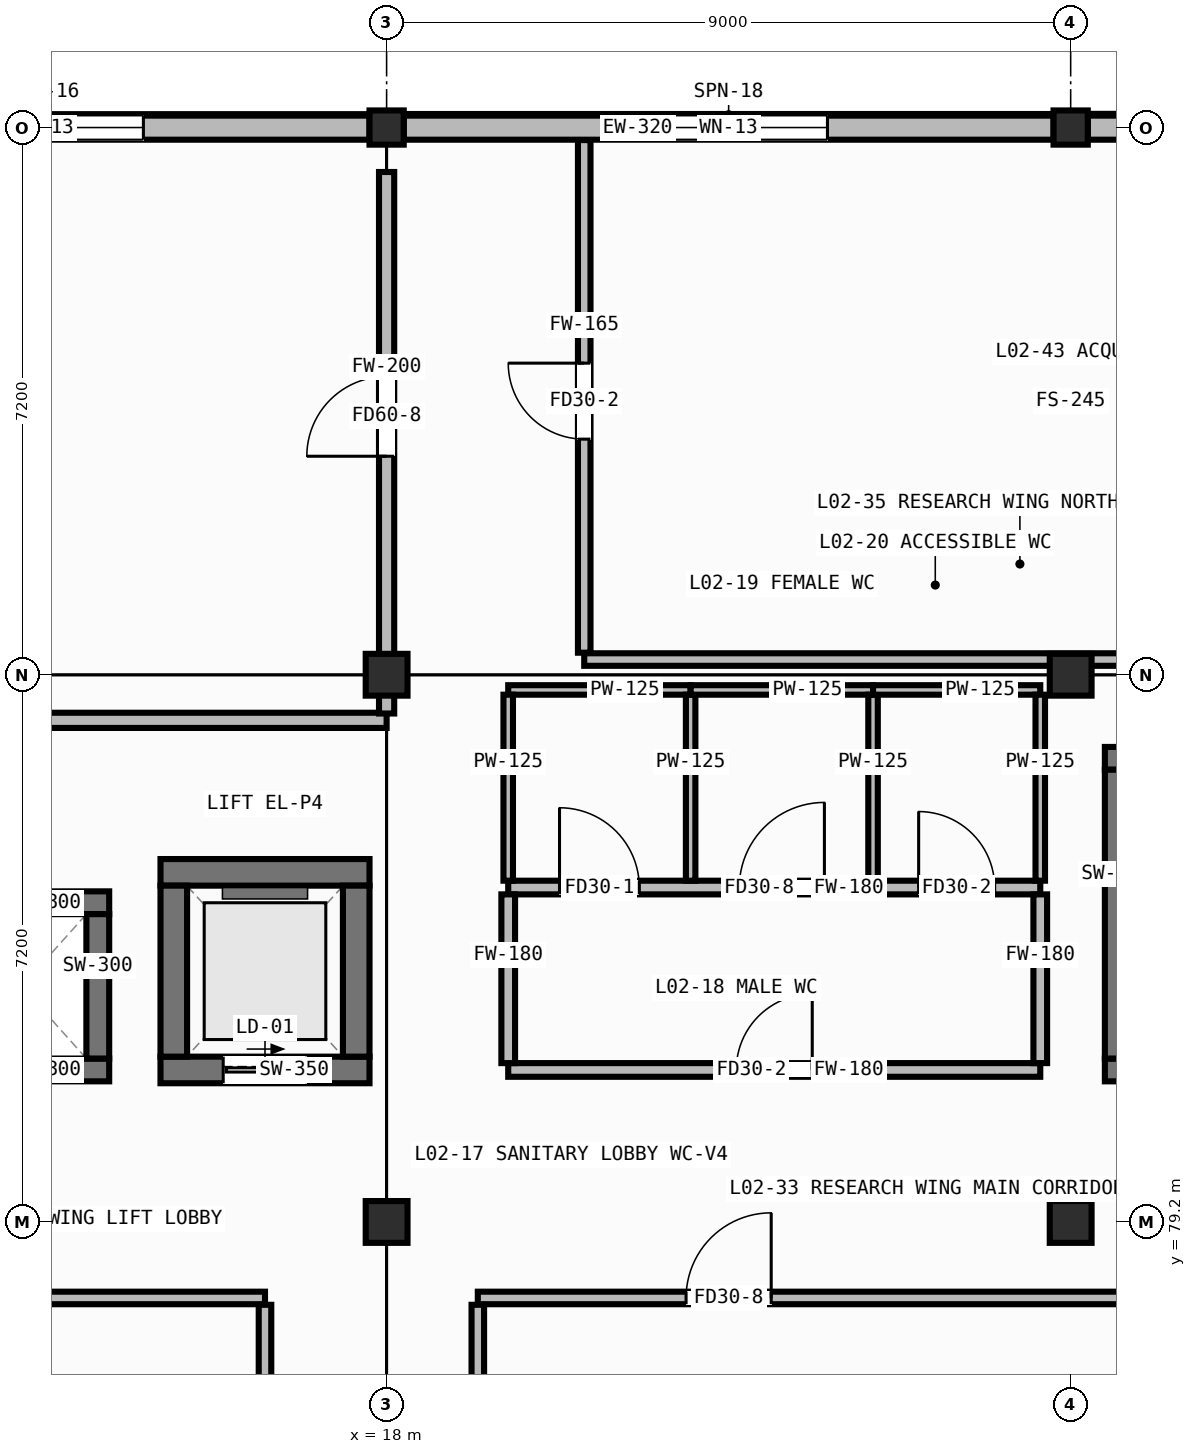
"""IFC4 building model, lengths in metres.
Left out: names, types, materials, properties, quantities, classifications, styles, units other than length and angle.
Written with IfcOpenShell. Run it as: python <this file> out.ifc"""

import sys

from ifc_helpers import new_model, si_unit, direction, frame, frame_2d, origin, origin_2d, place, context, subcontext, project, spatial, rectangle, hollow_rectangle, extrude, element, fill, save


model = new_model("IFC4")
c1 = context("Model", 3, precision=1e-05, world=origin(), true_north=direction((0.0, 1.0)))
c2 = subcontext(c1, "Body", "Model", "MODEL_VIEW")
j1 = project(units=[si_unit("LENGTHUNIT", "METRE"), si_unit("PLANEANGLEUNIT", "RADIAN")], contexts=[c1])
p1 = place(None, origin())
s1 = spatial("IfcSite", under=j1, at=p1, CompositionType="ELEMENT")
p2 = place(p1, origin())
s2 = spatial("IfcBuilding", under=s1, at=p2, CompositionType="ELEMENT")
p3 = place(p2, frame((0.0, 0.0, 4.8)))
s3 = spatial("IfcBuildingStorey", under=s2, at=p3, CompositionType="ELEMENT", Elevation=4.8)
for number, where, z_axis, x_axis in (
    (1, (18.0, 79.2, 0.0), (0.0, 0.0, 1.0), (1.0, 0.0, 0.0)),
    (2, (18.0, 86.4, 0.0), (0.0, 0.0, 1.0), (1.0, 0.0, 0.0)),
):
    element("IfcColumn", number, at=place(p3, frame(where, z_axis=z_axis, x_axis=x_axis)), inside=s3, PredefinedType="COLUMN", context=c2, shape_type="SweptSolid", body=[
        extrude(hollow_rectangle(XDim=0.55, YDim=0.55, WallThickness=0.022, at=origin_2d()), origin(), (0.0, 0.0, 1.0), 4.0),
    ])
p4 = place(p3, frame((18.0, 93.6, 0.0), z_axis=(0.0, 0.0, 1.0), x_axis=(1.0, 0.0, 0.0)))
e3 = element("IfcColumn", 3, at=p4, inside=s3, PredefinedType="COLUMN", context=c2, shape_type="SweptSolid", body=[
    extrude(hollow_rectangle(XDim=0.45, YDim=0.45, WallThickness=0.019, at=origin_2d()), origin(), (0.0, 0.0, 1.0), 4.0),
])
for number, where, z_axis, x_axis in (
    (4, (27.0, 79.2, 0.0), (0.0, 0.0, 1.0), (1.0, 0.0, 0.0)),
    (5, (27.0, 86.4, 0.0), (0.0, 0.0, 1.0), (1.0, 0.0, 0.0)),
):
    element("IfcColumn", number, at=place(p3, frame(where, z_axis=z_axis, x_axis=x_axis)), inside=s3, PredefinedType="COLUMN", context=c2, shape_type="SweptSolid", body=[
        extrude(hollow_rectangle(XDim=0.55, YDim=0.55, WallThickness=0.022, at=origin_2d()), origin(), (0.0, 0.0, 1.0), 4.0),
    ])
p5 = place(p3, frame((27.0, 93.6, 0.0), z_axis=(0.0, 0.0, 1.0), x_axis=(1.0, 0.0, 0.0)))
e6 = element("IfcColumn", 6, at=p5, inside=s3, PredefinedType="COLUMN", context=c2, shape_type="SweptSolid", body=[
    extrude(hollow_rectangle(XDim=0.45, YDim=0.45, WallThickness=0.019, at=origin_2d()), origin(), (0.0, 0.0, 1.0), 4.0),
])
p6 = place(p3, frame((17.775, 93.6, 0.0), z_axis=(0.0, 0.0, 1.0), x_axis=(-1.0, 0.0, 0.0)))
e7 = element("IfcWall", 7, at=p6, inside=s3, PredefinedType="STANDARD", context=c2, shape_type="SweptSolid", body=[
    extrude(rectangle(XDim=8.55, YDim=0.32, at=frame_2d((4.275, 0.0))), origin(), (0.0, 0.0, 1.0), 3.255),
])
p7 = place(p6, frame((2.975, 0.0, 0.85)))
e8 = element("IfcOpeningElement", 8, at=p7, cuts=e7, PredefinedType="OPENING", context=c2, shape_type="SweptSolid", body=[
    extrude(rectangle(XDim=2.6, YDim=1.6, at=frame_2d((1.3, 0.8))), frame((0.0, 0.172, 0.0), z_axis=(0.0, -1.0, 0.0), x_axis=(1.0, 0.0, 0.0)), (0.0, 0.0, 1.0), 0.344),
])
p8 = place(p3, frame((26.775, 93.6, 0.0), z_axis=(0.0, 0.0, 1.0), x_axis=(-1.0, 0.0, 0.0)))
e9 = element("IfcWall", 9, at=p8, inside=s3, PredefinedType="STANDARD", context=c2, shape_type="SweptSolid", body=[
    extrude(rectangle(XDim=8.55, YDim=0.32, at=frame_2d((4.275, 0.0))), origin(), (0.0, 0.0, 1.0), 3.255),
])
p9 = place(p8, frame((2.975, 0.0, 0.85)))
e10 = element("IfcOpeningElement", 10, at=p9, cuts=e9, PredefinedType="OPENING", context=c2, shape_type="SweptSolid", body=[
    extrude(rectangle(XDim=2.6, YDim=1.6, at=frame_2d((1.3, 0.8))), frame((0.0, 0.172, 0.0), z_axis=(0.0, -1.0, 0.0), x_axis=(1.0, 0.0, 0.0)), (0.0, 0.0, 1.0), 0.344),
])
p10 = place(p3, frame((35.775, 93.6, 0.0), z_axis=(0.0, 0.0, 1.0), x_axis=(-1.0, 0.0, 0.0)))
e11 = element("IfcWall", 11, at=p10, inside=s3, PredefinedType="STANDARD", context=c2, shape_type="SweptSolid", body=[
    extrude(rectangle(XDim=8.55, YDim=0.32, at=frame_2d((4.275, 0.0))), origin(), (0.0, 0.0, 1.0), 3.255),
])
p11 = place(p10, frame((2.975, 0.0, 0.85)))
e12 = element("IfcOpeningElement", 12, at=p11, cuts=e11, PredefinedType="OPENING", context=c2, shape_type="SweptSolid", body=[
    extrude(rectangle(XDim=2.6, YDim=1.6, at=frame_2d((1.3, 0.8))), frame((0.0, 0.172, 0.0), z_axis=(0.0, -1.0, 0.0), x_axis=(1.0, 0.0, 0.0)), (0.0, 0.0, 1.0), 0.344),
])
p12 = place(p3, frame((27.45, 81.2, 0.0), z_axis=(0.0, 0.0, 1.0), x_axis=(1.0, 0.0, 0.0)))
e13 = element("IfcWall", 13, at=p12, inside=s3, PredefinedType="SHEAR", context=c2, shape_type="SweptSolid", body=[
    extrude(rectangle(XDim=8.1, YDim=0.3, at=frame_2d((4.05, 0.0))), origin(), (0.0, 0.0, 1.0), 3.755),
])
p13 = place(p12, frame((0.5, 0.0, 0.0)))
e14 = element("IfcOpeningElement", 14, at=p13, cuts=e13, PredefinedType="OPENING", context=c2, shape_type="SweptSolid", body=[
    extrude(rectangle(XDim=1.2, YDim=2.1, at=frame_2d((0.6, 1.05))), frame((0.0, 0.162, 0.0), z_axis=(0.0, -1.0, 0.0), x_axis=(1.0, 0.0, 0.0)), (0.0, 0.0, 1.0), 0.324),
])
p14 = place(p3, frame((27.45, 85.3, 0.0), z_axis=(0.0, 0.0, 1.0), x_axis=(1.0, 0.0, 0.0)))
e15 = element("IfcWall", 15, at=p14, inside=s3, PredefinedType="SHEAR", context=c2, shape_type="SweptSolid", body=[
    extrude(rectangle(XDim=8.1, YDim=0.3, at=frame_2d((4.05, 0.0))), origin(), (0.0, 0.0, 1.0), 3.755),
])
p15 = place(p3, frame((27.6, 81.35, 0.0), z_axis=(0.0, 0.0, 1.0), x_axis=(0.0, 1.0, 0.0)))
e16 = element("IfcWall", 16, at=p15, inside=s3, PredefinedType="SHEAR", context=c2, shape_type="SweptSolid", body=[
    extrude(rectangle(XDim=3.8, YDim=0.3, at=frame_2d((1.9, 0.0))), origin(), (0.0, 0.0, 1.0), 3.755),
])
p16 = place(p3, frame((15.025, 81.2, 0.0), z_axis=(0.0, 0.0, 1.0), x_axis=(1.0, 0.0, 0.0)))
e17 = element("IfcWall", 17, at=p16, inside=s3, PredefinedType="SHEAR", context=c2, shape_type="SweptSolid", body=[
    extrude(rectangle(XDim=2.75, YDim=0.35, at=frame_2d((1.375, 0.0))), origin(), (0.0, 0.0, 1.0), 3.755),
])
p17 = place(p16, frame((0.825, 0.0, 0.0)))
e18 = element("IfcOpeningElement", 18, at=p17, cuts=e17, PredefinedType="OPENING", context=c2, shape_type="SweptSolid", body=[
    extrude(rectangle(XDim=1.1, YDim=2.1, at=frame_2d((0.55, 1.05))), frame((0.0, 0.187, 0.0), z_axis=(0.0, -1.0, 0.0), x_axis=(1.0, 0.0, 0.0)), (0.0, 0.0, 1.0), 0.374),
])
p18 = place(p3, frame((15.025, 83.8, 0.0), z_axis=(0.0, 0.0, 1.0), x_axis=(1.0, 0.0, 0.0)))
e19 = element("IfcWall", 19, at=p18, inside=s3, PredefinedType="SHEAR", context=c2, shape_type="SweptSolid", body=[
    extrude(rectangle(XDim=2.75, YDim=0.35, at=frame_2d((1.375, 0.0))), origin(), (0.0, 0.0, 1.0), 3.755),
])
for number, where, z_axis, x_axis in (
    (20, (15.2, 81.375, 0.0), (0.0, 0.0, 1.0), (0.0, 1.0, 0.0)),
    (21, (17.6, 81.375, 0.0), (0.0, 0.0, 1.0), (0.0, 1.0, 0.0)),
):
    element("IfcWall", number, at=place(p3, frame(where, z_axis=z_axis, x_axis=x_axis)), inside=s3, PredefinedType="SHEAR", context=c2, shape_type="SweptSolid", body=[
        extrude(rectangle(XDim=2.25, YDim=0.35, at=frame_2d((1.125, 0.0))), origin(), (0.0, 0.0, 1.0), 3.755),
    ])
for number, where, z_axis, x_axis in (
    (22, (12.05, 81.2, 0.0), (0.0, 0.0, 1.0), (1.0, 0.0, 0.0)),
    (23, (12.05, 83.4, 0.0), (0.0, 0.0, 1.0), (1.0, 0.0, 0.0)),
):
    element("IfcWall", number, at=place(p3, frame(where, z_axis=z_axis, x_axis=x_axis)), inside=s3, PredefinedType="SHEAR", context=c2, shape_type="SweptSolid", body=[
        extrude(rectangle(XDim=2.3, YDim=0.3, at=frame_2d((1.15, 0.0))), origin(), (0.0, 0.0, 1.0), 3.755),
    ])
p19 = place(p3, frame((14.2, 81.35, 0.0), z_axis=(0.0, 0.0, 1.0), x_axis=(0.0, 1.0, 0.0)))
e24 = element("IfcWall", 24, at=p19, inside=s3, PredefinedType="SHEAR", context=c2, shape_type="SweptSolid", body=[
    extrude(rectangle(XDim=1.9, YDim=0.3, at=frame_2d((0.95, 0.0))), origin(), (0.0, 0.0, 1.0), 3.755),
])
p20 = place(p3, frame((19.6, 81.2, 0.0), z_axis=(0.0, 0.0, 1.0), x_axis=(1.0, 0.0, 0.0)))
e25 = element("IfcWall", 25, at=p20, inside=s3, PredefinedType="PARTITIONING", context=c2, shape_type="SweptSolid", body=[
    extrude(rectangle(XDim=7.0, YDim=0.18, at=frame_2d((3.5, 0.0))), origin(), (0.0, 0.0, 1.0), 3.755),
])
p21 = place(p20, frame((3.0, 0.0, 0.0)))
e26 = element("IfcOpeningElement", 26, at=p21, cuts=e25, PredefinedType="OPENING", context=c2, shape_type="SweptSolid", body=[
    extrude(rectangle(XDim=1.0, YDim=2.08, at=frame_2d((0.5, 1.04))), frame((0.0, 0.102, 0.0), z_axis=(0.0, -1.0, 0.0), x_axis=(1.0, 0.0, 0.0)), (0.0, 0.0, 1.0), 0.204),
])
p22 = place(p3, frame((19.6, 83.6, 0.0), z_axis=(0.0, 0.0, 1.0), x_axis=(1.0, 0.0, 0.0)))
e27 = element("IfcWall", 27, at=p22, inside=s3, PredefinedType="PARTITIONING", context=c2, shape_type="SweptSolid", body=[
    extrude(rectangle(XDim=7.0, YDim=0.18, at=frame_2d((3.5, 0.0))), origin(), (0.0, 0.0, 1.0), 3.755),
])
p23 = place(p22, frame((0.675, 0.0, 0.0)))
e28 = element("IfcOpeningElement", 28, at=p23, cuts=e27, PredefinedType="OPENING", context=c2, shape_type="SweptSolid", body=[
    extrude(rectangle(XDim=1.05, YDim=2.1, at=frame_2d((0.525, 1.05))), frame((0.0, 0.102, 0.0), z_axis=(0.0, -1.0, 0.0), x_axis=(1.0, 0.0, 0.0)), (0.0, 0.0, 1.0), 0.204),
])
p24 = place(p22, frame((3.04, 0.0, 0.0)))
e29 = element("IfcOpeningElement", 29, at=p24, cuts=e27, PredefinedType="OPENING", context=c2, shape_type="SweptSolid", body=[
    extrude(rectangle(XDim=1.12, YDim=2.08, at=frame_2d((0.56, 1.04))), frame((0.0, 0.102, 0.0), z_axis=(0.0, -1.0, 0.0), x_axis=(1.0, 0.0, 0.0)), (0.0, 0.0, 1.0), 0.204),
])
p25 = place(p22, frame((5.4, 0.0, 0.0)))
e30 = element("IfcOpeningElement", 30, at=p25, cuts=e27, PredefinedType="OPENING", context=c2, shape_type="SweptSolid", body=[
    extrude(rectangle(XDim=1.0, YDim=2.08, at=frame_2d((0.5, 1.04))), frame((0.0, 0.102, 0.0), z_axis=(0.0, -1.0, 0.0), x_axis=(1.0, 0.0, 0.0)), (0.0, 0.0, 1.0), 0.204),
])
for number, where, z_axis, x_axis in (
    (31, (19.6, 81.29, 0.0), (0.0, 0.0, 1.0), (0.0, 1.0, 0.0)),
    (32, (26.6, 81.29, 0.0), (0.0, 0.0, 1.0), (0.0, 1.0, 0.0)),
):
    element("IfcWall", number, at=place(p3, frame(where, z_axis=z_axis, x_axis=x_axis)), inside=s3, PredefinedType="PARTITIONING", context=c2, shape_type="SweptSolid", body=[
        extrude(rectangle(XDim=2.22, YDim=0.18, at=frame_2d((1.11, 0.0))), origin(), (0.0, 0.0, 1.0), 3.755),
    ])
p26 = place(p3, frame((19.6, 86.2, 0.0), z_axis=(0.0, 0.0, 1.0), x_axis=(1.0, 0.0, 0.0)))
e33 = element("IfcWall", 33, at=p26, inside=s3, PredefinedType="PARTITIONING", context=c2, shape_type="SweptSolid", body=[
    extrude(rectangle(XDim=2.4, YDim=0.125, at=frame_2d((1.2, 0.0))), origin(), (0.0, 0.0, 1.0), 3.035),
])
for number, where, z_axis, x_axis in (
    (34, (19.6, 83.69, 0.0), (0.0, 0.0, 1.0), (0.0, 1.0, 0.0)),
    (35, (22.0, 83.69, 0.0), (0.0, 0.0, 1.0), (0.0, 1.0, 0.0)),
):
    element("IfcWall", number, at=place(p3, frame(where, z_axis=z_axis, x_axis=x_axis)), inside=s3, PredefinedType="PARTITIONING", context=c2, shape_type="SweptSolid", body=[
        extrude(rectangle(XDim=2.448, YDim=0.125, at=frame_2d((1.224, 0.0))), origin(), (0.0, 0.0, 1.0), 3.755),
    ])
p27 = place(p3, frame((22.0, 86.2, 0.0), z_axis=(0.0, 0.0, 1.0), x_axis=(1.0, 0.0, 0.0)))
e36 = element("IfcWall", 36, at=p27, inside=s3, PredefinedType="PARTITIONING", context=c2, shape_type="SweptSolid", body=[
    extrude(rectangle(XDim=2.4, YDim=0.125, at=frame_2d((1.2, 0.0))), origin(), (0.0, 0.0, 1.0), 3.035),
])
p28 = place(p3, frame((24.4, 83.69, 0.0), z_axis=(0.0, 0.0, 1.0), x_axis=(0.0, 1.0, 0.0)))
e37 = element("IfcWall", 37, at=p28, inside=s3, PredefinedType="PARTITIONING", context=c2, shape_type="SweptSolid", body=[
    extrude(rectangle(XDim=2.448, YDim=0.125, at=frame_2d((1.224, 0.0))), origin(), (0.0, 0.0, 1.0), 3.755),
])
p29 = place(p3, frame((24.4, 86.2, 0.0), z_axis=(0.0, 0.0, 1.0), x_axis=(1.0, 0.0, 0.0)))
e38 = element("IfcWall", 38, at=p29, inside=s3, PredefinedType="PARTITIONING", context=c2, shape_type="SweptSolid", body=[
    extrude(rectangle(XDim=2.2, YDim=0.125, at=frame_2d((1.1, 0.0))), origin(), (0.0, 0.0, 1.0), 3.035),
])
p30 = place(p3, frame((26.6, 83.69, 0.0), z_axis=(0.0, 0.0, 1.0), x_axis=(0.0, 1.0, 0.0)))
e39 = element("IfcWall", 39, at=p30, inside=s3, PredefinedType="PARTITIONING", context=c2, shape_type="SweptSolid", body=[
    extrude(rectangle(XDim=2.448, YDim=0.125, at=frame_2d((1.224, 0.0))), origin(), (0.0, 0.0, 1.0), 3.755),
])
p31 = place(p3, frame((0.035, 78.2, 0.0), z_axis=(0.0, 0.0, 1.0), x_axis=(1.0, 0.0, 0.0)))
e40 = element("IfcWall", 40, at=p31, inside=s3, PredefinedType="PARTITIONING", context=c2, shape_type="SweptSolid", body=[
    extrude(rectangle(XDim=16.365, YDim=0.165, at=frame_2d((8.183, 0.0))), origin(), (0.0, 0.0, 1.0), 3.755),
])
p32 = place(p31, frame((3.94, 0.0, 0.0)))
e41 = element("IfcOpeningElement", 41, at=p32, cuts=e40, PredefinedType="OPENING", context=c2, shape_type="SweptSolid", body=[
    extrude(rectangle(XDim=1.05, YDim=2.1, at=frame_2d((0.525, 1.05))), frame((0.0, 0.094, 0.0), z_axis=(0.0, -1.0, 0.0), x_axis=(1.0, 0.0, 0.0)), (0.0, 0.0, 1.0), 0.189),
])
p33 = place(p3, frame((16.4, 57.765, 0.0), z_axis=(0.0, 0.0, 1.0), x_axis=(0.0, 1.0, 0.0)))
e42 = element("IfcWall", 42, at=p33, inside=s3, PredefinedType="PARTITIONING", context=c2, shape_type="SweptSolid", body=[
    extrude(rectangle(XDim=20.345, YDim=0.165, at=frame_2d((10.173, 0.0))), origin(), (0.0, 0.0, 1.0), 3.755),
])
p34 = place(p3, frame((19.2, 78.2, 0.0), z_axis=(0.0, 0.0, 1.0), x_axis=(1.0, 0.0, 0.0)))
e43 = element("IfcWall", 43, at=p34, inside=s3, PredefinedType="PARTITIONING", context=c2, shape_type="SweptSolid", body=[
    extrude(rectangle(XDim=16.765, YDim=0.165, at=frame_2d((8.383, 0.0))), origin(), (0.0, 0.0, 1.0), 3.755),
])
p35 = place(p34, frame((2.74, 0.0, 0.0)))
e44 = element("IfcOpeningElement", 44, at=p35, cuts=e43, PredefinedType="OPENING", context=c2, shape_type="SweptSolid", body=[
    extrude(rectangle(XDim=1.12, YDim=2.08, at=frame_2d((0.56, 1.04))), frame((0.0, 0.094, 0.0), z_axis=(0.0, -1.0, 0.0), x_axis=(1.0, 0.0, 0.0)), (0.0, 0.0, 1.0), 0.189),
])
p36 = place(p3, frame((19.2, 68.89, 0.0), z_axis=(0.0, 0.0, 1.0), x_axis=(0.0, 1.0, 0.0)))
e45 = element("IfcWall", 45, at=p36, inside=s3, PredefinedType="PARTITIONING", context=c2, shape_type="SweptSolid", body=[
    extrude(rectangle(XDim=9.22, YDim=0.165, at=frame_2d((4.61, 0.0))), origin(), (0.0, 0.0, 1.0), 3.755),
])
p37 = place(p3, frame((0.155, 85.8, 0.0), z_axis=(0.0, 0.0, 1.0), x_axis=(1.0, 0.0, 0.0)))
e46 = element("IfcWall", 46, at=p37, inside=s3, PredefinedType="PARTITIONING", context=c2, shape_type="SweptSolid", body=[
    extrude(rectangle(XDim=17.845, YDim=0.2, at=frame_2d((8.922, 0.0))), origin(), (0.0, 0.0, 1.0), 3.755),
])
p38 = place(p3, frame((18.0, 85.89, 0.0), z_axis=(0.0, 0.0, 1.0), x_axis=(0.0, 1.0, 0.0)))
e47 = element("IfcWall", 47, at=p38, inside=s3, PredefinedType="PARTITIONING", context=c2, shape_type="SweptSolid", body=[
    extrude(rectangle(XDim=7.125, YDim=0.2, at=frame_2d((3.562, 0.0))), origin(), (0.0, 0.0, 1.0), 3.035),
])
p39 = place(p38, frame((3.385, 0.0, 0.0)))
e48 = element("IfcOpeningElement", 48, at=p39, cuts=e47, PredefinedType="OPENING", context=c2, shape_type="SweptSolid", body=[
    extrude(rectangle(XDim=1.05, YDim=2.02, at=frame_2d((0.525, 1.01))), frame((0.0, 0.112, 0.0), z_axis=(0.0, -1.0, 0.0), x_axis=(1.0, 0.0, 0.0)), (0.0, 0.0, 1.0), 0.224),
])
p40 = place(p3, frame((20.6, 86.6, 0.0), z_axis=(0.0, 0.0, 1.0), x_axis=(1.0, 0.0, 0.0)))
e49 = element("IfcWall", 49, at=p40, inside=s3, PredefinedType="PARTITIONING", context=c2, shape_type="SweptSolid", body=[
    extrude(rectangle(XDim=14.945, YDim=0.165, at=frame_2d((7.472, 0.0))), origin(), (0.0, 0.0, 1.0), 3.035),
])
p41 = place(p3, frame((20.6, 86.69, 0.0), z_axis=(0.0, 0.0, 1.0), x_axis=(0.0, 1.0, 0.0)))
e50 = element("IfcWall", 50, at=p41, inside=s3, PredefinedType="PARTITIONING", context=c2, shape_type="SweptSolid", body=[
    extrude(rectangle(XDim=6.745, YDim=0.165, at=frame_2d((3.373, 0.0))), origin(), (0.0, 0.0, 1.0), 3.755),
])
p42 = place(p41, frame((2.81, 0.0, 0.0)))
e51 = element("IfcOpeningElement", 51, at=p42, cuts=e50, PredefinedType="OPENING", context=c2, shape_type="SweptSolid", body=[
    extrude(rectangle(XDim=1.0, YDim=2.08, at=frame_2d((0.5, 1.04))), frame((0.0, 0.094, 0.0), z_axis=(0.0, -1.0, 0.0), x_axis=(1.0, 0.0, 0.0)), (0.0, 0.0, 1.0), 0.189),
])
p43 = place(p7, origin())
e52 = element("IfcWindow", 52, at=p43, inside=s3, PartitioningType="DOUBLE_PANEL_VERTICAL", PredefinedType="WINDOW", context=c2, shape_type="SweptSolid", body=[
    extrude(rectangle(XDim=2.6, YDim=1.6, at=frame_2d((1.3, 0.8))), frame((0.0, 0.03, 0.0), z_axis=(0.0, -1.0, 0.0), x_axis=(1.0, 0.0, 0.0)), (0.0, 0.0, 1.0), 0.06),
])
fill(e8, e52)
p44 = place(p9, origin())
e53 = element("IfcWindow", 53, at=p44, inside=s3, PartitioningType="DOUBLE_PANEL_VERTICAL", PredefinedType="WINDOW", context=c2, shape_type="SweptSolid", body=[
    extrude(rectangle(XDim=2.6, YDim=1.6, at=frame_2d((1.3, 0.8))), frame((0.0, 0.03, 0.0), z_axis=(0.0, -1.0, 0.0), x_axis=(1.0, 0.0, 0.0)), (0.0, 0.0, 1.0), 0.06),
])
fill(e10, e53)
p45 = place(p17, origin())
e54 = element("IfcDoor", 54, at=p45, inside=s3, OperationType="SLIDING_TO_LEFT", PredefinedType="DOOR", context=c2, shape_type="SweptSolid", body=[
    extrude(rectangle(XDim=1.1, YDim=2.1, at=frame_2d((0.55, 1.05))), frame((0.0, 0.025, 0.0), z_axis=(0.0, -1.0, 0.0), x_axis=(1.0, 0.0, 0.0)), (0.0, 0.0, 1.0), 0.05),
])
fill(e18, e54)
p46 = place(p21, origin())
e55 = element("IfcDoor", 55, at=p46, inside=s3, OperationType="SINGLE_SWING_RIGHT", PredefinedType="DOOR", context=c2, shape_type="SweptSolid", body=[
    extrude(rectangle(XDim=1.0, YDim=2.08, at=frame_2d((0.5, 1.04))), frame((0.0, 0.025, 0.0), z_axis=(0.0, -1.0, 0.0), x_axis=(1.0, 0.0, 0.0)), (0.0, 0.0, 1.0), 0.05),
])
fill(e26, e55)
p47 = place(p23, origin())
e56 = element("IfcDoor", 56, at=p47, inside=s3, OperationType="SINGLE_SWING_LEFT", PredefinedType="DOOR", context=c2, shape_type="SweptSolid", body=[
    extrude(rectangle(XDim=1.05, YDim=2.1, at=frame_2d((0.525, 1.05))), frame((0.0, 0.025, 0.0), z_axis=(0.0, -1.0, 0.0), x_axis=(1.0, 0.0, 0.0)), (0.0, 0.0, 1.0), 0.05),
])
fill(e28, e56)
p48 = place(p24, origin())
e57 = element("IfcDoor", 57, at=p48, inside=s3, OperationType="SINGLE_SWING_RIGHT", PredefinedType="DOOR", context=c2, shape_type="SweptSolid", body=[
    extrude(rectangle(XDim=1.12, YDim=2.08, at=frame_2d((0.56, 1.04))), frame((0.0, 0.025, 0.0), z_axis=(0.0, -1.0, 0.0), x_axis=(1.0, 0.0, 0.0)), (0.0, 0.0, 1.0), 0.05),
])
fill(e29, e57)
p49 = place(p25, origin())
e58 = element("IfcDoor", 58, at=p49, inside=s3, OperationType="SINGLE_SWING_LEFT", PredefinedType="DOOR", context=c2, shape_type="SweptSolid", body=[
    extrude(rectangle(XDim=1.0, YDim=2.08, at=frame_2d((0.5, 1.04))), frame((0.0, 0.025, 0.0), z_axis=(0.0, -1.0, 0.0), x_axis=(1.0, 0.0, 0.0)), (0.0, 0.0, 1.0), 0.05),
])
fill(e30, e58)
p50 = place(p35, origin())
e59 = element("IfcDoor", 59, at=p50, inside=s3, OperationType="SINGLE_SWING_RIGHT", PredefinedType="DOOR", context=c2, shape_type="SweptSolid", body=[
    extrude(rectangle(XDim=1.12, YDim=2.08, at=frame_2d((0.56, 1.04))), frame((0.0, 0.025, 0.0), z_axis=(0.0, -1.0, 0.0), x_axis=(1.0, 0.0, 0.0)), (0.0, 0.0, 1.0), 0.05),
])
fill(e44, e59)
p51 = place(p39, origin())
e60 = element("IfcDoor", 60, at=p51, inside=s3, OperationType="SINGLE_SWING_LEFT", PredefinedType="DOOR", context=c2, shape_type="SweptSolid", body=[
    extrude(rectangle(XDim=1.05, YDim=2.02, at=frame_2d((0.525, 1.01))), frame((0.0, 0.025, 0.0), z_axis=(0.0, -1.0, 0.0), x_axis=(1.0, 0.0, 0.0)), (0.0, 0.0, 1.0), 0.05),
])
fill(e48, e60)
p52 = place(p42, origin())
e61 = element("IfcDoor", 61, at=p52, inside=s3, OperationType="SINGLE_SWING_RIGHT", PredefinedType="DOOR", context=c2, shape_type="SweptSolid", body=[
    extrude(rectangle(XDim=1.0, YDim=2.08, at=frame_2d((0.5, 1.04))), frame((0.0, 0.025, 0.0), z_axis=(0.0, -1.0, 0.0), x_axis=(1.0, 0.0, 0.0)), (0.0, 0.0, 1.0), 0.05),
])
fill(e51, e61)
save(model, sys.argv[1])
